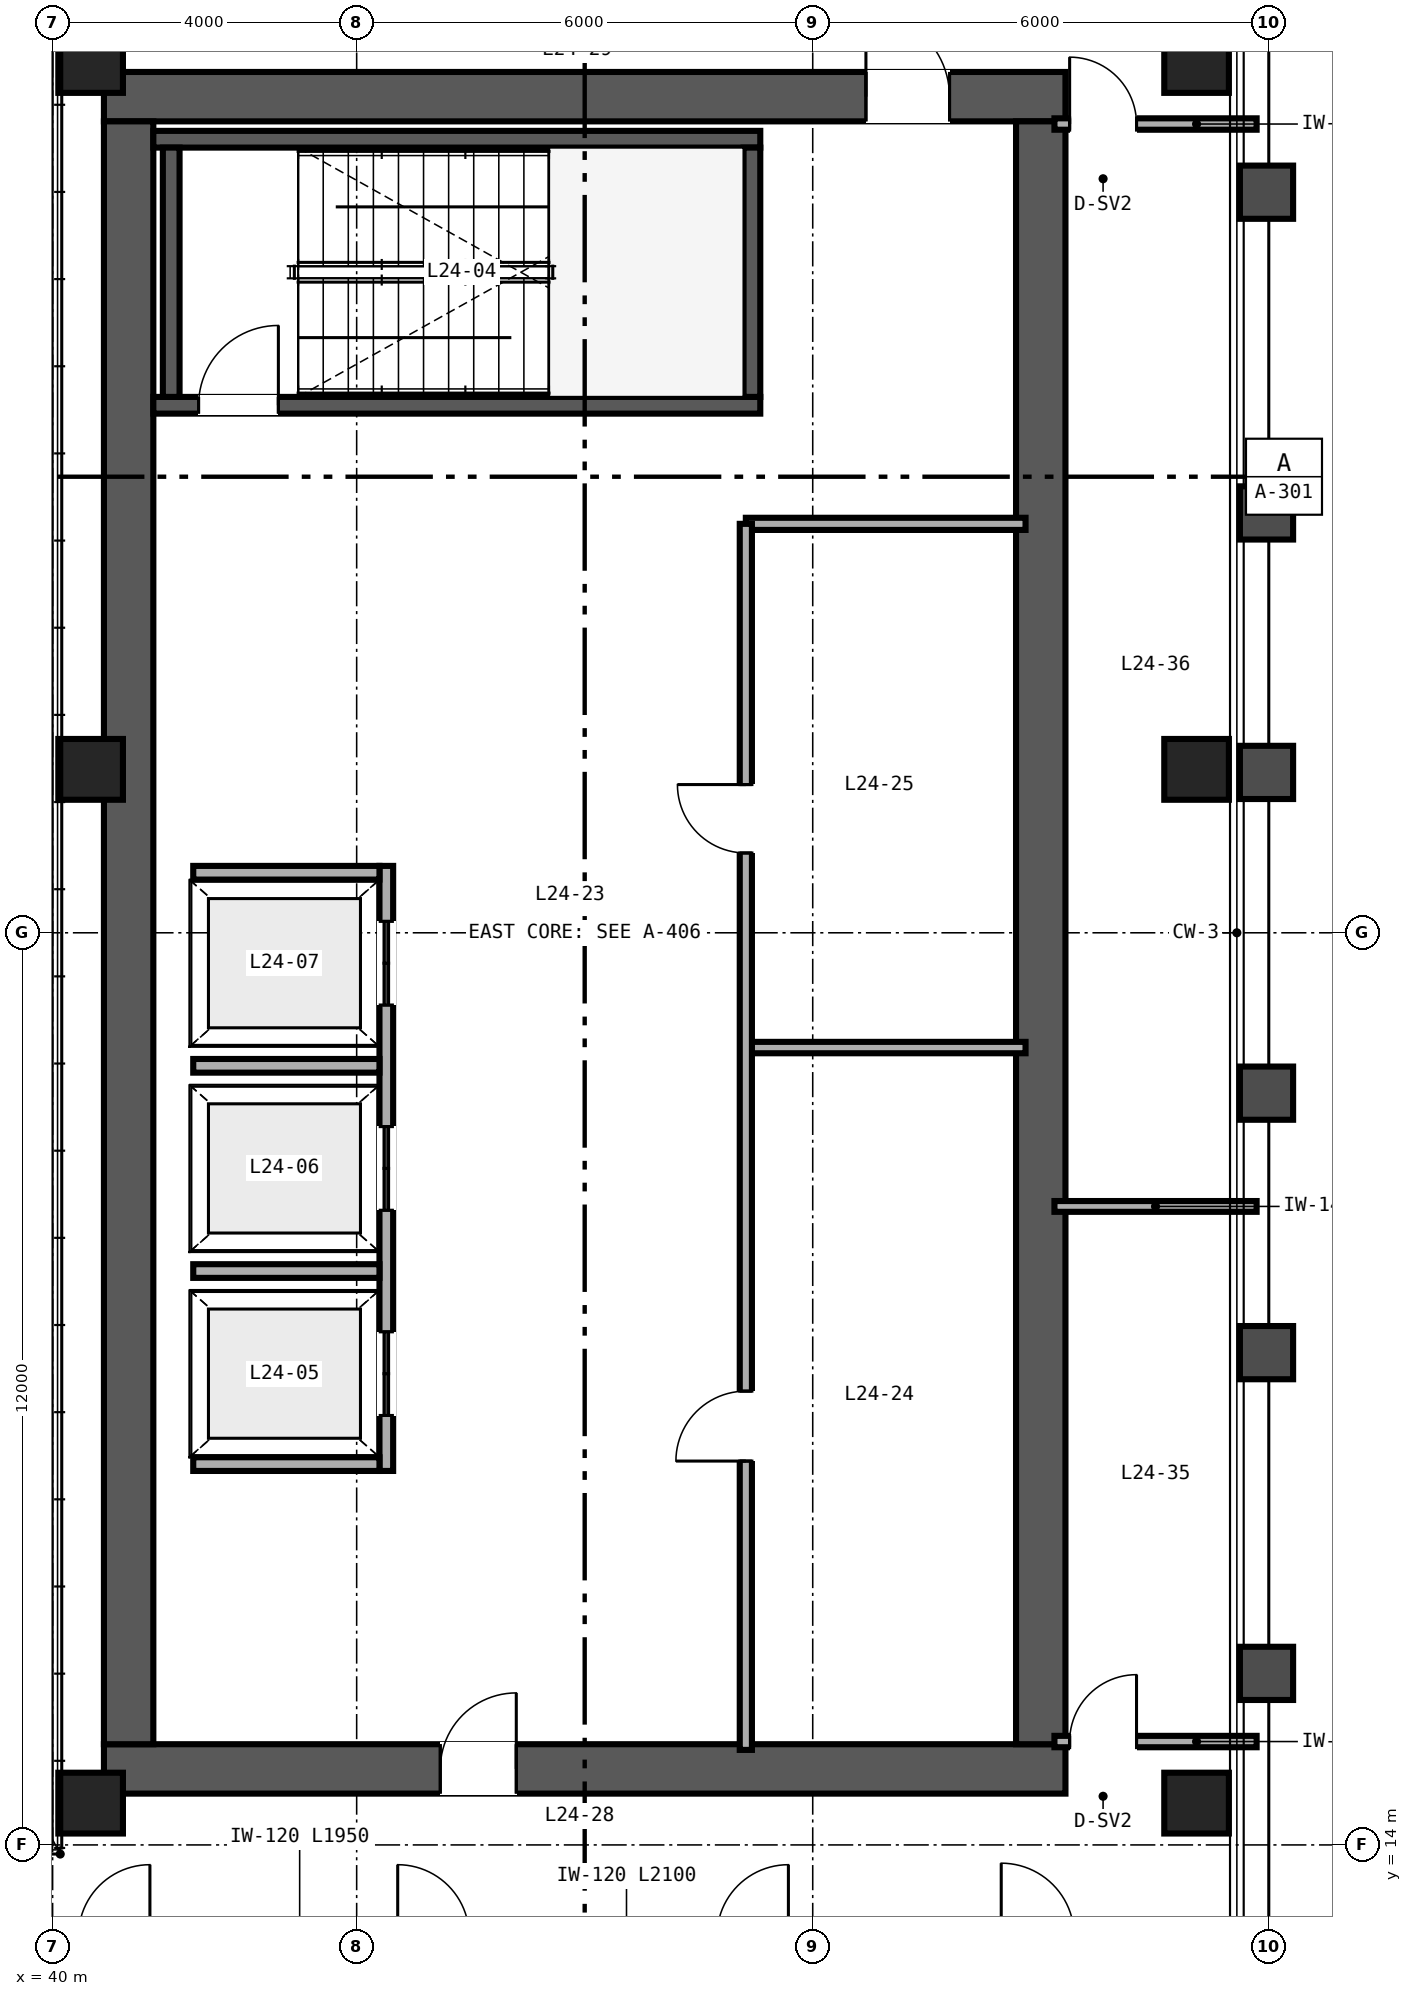
"""IFC4 building model, lengths in metres.
Left out: names, types, materials, properties, quantities, classifications, styles, units other than length and angle.
Written with IfcOpenShell. Run it as: python <this file> out.ifc"""

import sys

from ifc_helpers import new_model, si_unit, direction, frame, frame_2d, origin, origin_2d, place, context, subcontext, project, spatial, rectangle, hollow_rectangle, extrude, source, transform, mapped, element, fill, save


model = new_model("IFC4")
c1 = context("Model", 3, precision=1e-05, world=origin(), true_north=direction((0.0, 1.0)))
c2 = subcontext(c1, "Body", "Model", "MODEL_VIEW")
j1 = project(units=[si_unit("LENGTHUNIT", "METRE"), si_unit("PLANEANGLEUNIT", "RADIAN")], contexts=[c1])
p1 = place(None, origin())
s1 = spatial("IfcSite", under=j1, at=p1, CompositionType="ELEMENT")
p2 = place(p1, origin())
s2 = spatial("IfcBuilding", under=s1, at=p2, CompositionType="ELEMENT")
p3 = place(p2, frame((0.0, 0.0, 100.8)))
s3 = spatial("IfcBuildingStorey", under=s2, at=p3, CompositionType="ELEMENT", Elevation=100.8)
p4 = place(p3, frame((40.675, 15.0, 0.0), z_axis=(0.0, 0.0, 1.0), x_axis=(1.0, 0.0, 0.0)))
e1 = element("IfcWall", 1, at=p4, inside=s3, PredefinedType="SHEAR", context=c2, shape_type="SweptSolid", body=[
    extrude(rectangle(XDim=12.65, YDim=0.65, at=frame_2d((6.325, 0.0))), origin(), (0.0, 0.0, 1.0), 3.36),
])
p5 = place(p4, frame((4.425, 0.0, 0.0)))
e2 = element("IfcOpeningElement", 2, at=p5, cuts=e1, PredefinedType="OPENING", context=c2, shape_type="SweptSolid", body=[
    extrude(rectangle(XDim=1.0, YDim=2.15, at=frame_2d((0.5, 1.075))), frame((0.0, 0.335, 0.0), z_axis=(0.0, -1.0, 0.0), x_axis=(1.0, 0.0, 0.0)), (0.0, 0.0, 1.0), 0.67),
])
p6 = place(p3, frame((40.675, 37.0, 0.0), z_axis=(0.0, 0.0, 1.0), x_axis=(1.0, 0.0, 0.0)))
e3 = element("IfcWall", 3, at=p6, inside=s3, PredefinedType="SHEAR", context=c2, shape_type="SweptSolid", body=[
    extrude(rectangle(XDim=12.65, YDim=0.65, at=frame_2d((6.325, 0.0))), origin(), (0.0, 0.0, 1.0), 3.36),
])
p7 = place(p6, frame((10.025, 0.0, 0.0)))
e4 = element("IfcOpeningElement", 4, at=p7, cuts=e3, PredefinedType="OPENING", context=c2, shape_type="SweptSolid", body=[
    extrude(rectangle(XDim=1.1, YDim=2.15, at=frame_2d((0.55, 1.075))), frame((0.0, 0.335, 0.0), z_axis=(0.0, -1.0, 0.0), x_axis=(1.0, 0.0, 0.0)), (0.0, 0.0, 1.0), 0.67),
])
for number, where, z_axis, x_axis in (
    (5, (41.0, 15.325, 0.0), (0.0, 0.0, 1.0), (0.0, 1.0, 0.0)),
    (6, (53.0, 15.325, 0.0), (0.0, 0.0, 1.0), (0.0, 1.0, 0.0)),
):
    element("IfcWall", number, at=place(p3, frame(where, z_axis=z_axis, x_axis=x_axis)), inside=s3, PredefinedType="SHEAR", context=c2, shape_type="SweptSolid", body=[
        extrude(rectangle(XDim=21.35, YDim=0.65, at=frame_2d((10.675, 0.0))), origin(), (0.0, 0.0, 1.0), 3.36),
    ])
p8 = place(p3, frame((41.325, 32.94, 0.0), z_axis=(0.0, 0.0, 1.0), x_axis=(1.0, 0.0, 0.0)))
e7 = element("IfcWall", 7, at=p8, inside=s3, PredefinedType="SHEAR", context=c2, shape_type="SweptSolid", body=[
    extrude(rectangle(XDim=7.985, YDim=0.22, at=frame_2d((3.993, 0.0))), origin(), (0.0, 0.0, 1.0), 3.4),
])
p9 = place(p8, frame((0.595, 0.0, 0.0)))
e8 = element("IfcOpeningElement", 8, at=p9, cuts=e7, PredefinedType="OPENING", context=c2, shape_type="SweptSolid", body=[
    extrude(rectangle(XDim=1.05, YDim=2.15, at=frame_2d((0.525, 1.075))), frame((0.0, 0.12, 0.0), z_axis=(0.0, -1.0, 0.0), x_axis=(1.0, 0.0, 0.0)), (0.0, 0.0, 1.0), 0.24),
])
p10 = place(p3, frame((41.325, 36.44, 0.0), z_axis=(0.0, 0.0, 1.0), x_axis=(1.0, 0.0, 0.0)))
e9 = element("IfcWall", 9, at=p10, inside=s3, PredefinedType="SHEAR", context=c2, shape_type="SweptSolid", body=[
    extrude(rectangle(XDim=7.985, YDim=0.22, at=frame_2d((3.993, 0.0))), origin(), (0.0, 0.0, 1.0), 3.4),
])
for number, where, z_axis, x_axis in (
    (10, (41.56, 33.05, 0.0), (0.0, 0.0, 1.0), (0.0, 1.0, 0.0)),
    (11, (49.2, 33.05, 0.0), (0.0, 0.0, 1.0), (0.0, 1.0, 0.0)),
):
    element("IfcWall", number, at=place(p3, frame(where, z_axis=z_axis, x_axis=x_axis)), inside=s3, PredefinedType="SHEAR", context=c2, shape_type="SweptSolid", body=[
        extrude(rectangle(XDim=3.28, YDim=0.22, at=frame_2d((1.64, 0.0))), origin(), (0.0, 0.0, 1.0), 3.4),
    ])
m1 = source(origin(), c2, "Body", "SweptSolid", [
    extrude(hollow_rectangle(XDim=0.85, YDim=0.8, WallThickness=0.032, at=origin_2d()), origin(), (0.0, 0.0, 1.0), 3.36),
])
for number, where, z_axis, x_axis in (
    (12, (40.5, 14.55, 0.0), (0.0, 0.0, 1.0), (1.0, 0.0, 0.0)),
    (13, (55.05, 14.55, 0.0), (0.0, 0.0, 1.0), (1.0, 0.0, 0.0)),
    (14, (40.5, 28.15, 0.0), (0.0, 0.0, 1.0), (1.0, 0.0, 0.0)),
    (15, (55.05, 28.15, 0.0), (0.0, 0.0, 1.0), (1.0, 0.0, 0.0)),
    (16, (40.5, 37.45, 0.0), (0.0, 0.0, 1.0), (1.0, 0.0, 0.0)),
    (17, (55.05, 37.45, 0.0), (0.0, 0.0, 1.0), (1.0, 0.0, 0.0)),
):
    element("IfcColumn", number, at=place(p3, frame(where, z_axis=z_axis, x_axis=x_axis)), inside=s3, PredefinedType="COLUMN", context=c2, shape_type="MappedRepresentation", body=[
        mapped(m1, transform((0.0, 0.0, 0.0), scale=1.0)),
    ])
p11 = place(p3, frame((44.39, 18.92, 0.0), z_axis=(0.0, 0.0, 1.0), x_axis=(0.0, 1.0, 0.0)))
e18 = element("IfcWall", 18, at=p11, inside=s3, PredefinedType="SOLIDWALL", context=c2, shape_type="SweptSolid", body=[
    extrude(rectangle(XDim=7.96, YDim=0.18, at=frame_2d((3.98, 0.0))), origin(), (0.0, 0.0, 1.0), 3.36),
])
p12 = place(p11, frame((0.73, 0.0, 0.0)))
e19 = element("IfcOpeningElement", 19, at=p12, cuts=e18, PredefinedType="OPENING", context=c2, shape_type="SweptSolid", body=[
    extrude(rectangle(XDim=1.1, YDim=2.2, at=frame_2d((0.55, 1.1))), frame((0.0, 0.1, 0.0), z_axis=(0.0, -1.0, 0.0), x_axis=(1.0, 0.0, 0.0)), (0.0, 0.0, 1.0), 0.2),
])
p13 = place(p11, frame((3.43, 0.0, 0.0)))
e20 = element("IfcOpeningElement", 20, at=p13, cuts=e18, PredefinedType="OPENING", context=c2, shape_type="SweptSolid", body=[
    extrude(rectangle(XDim=1.1, YDim=2.2, at=frame_2d((0.55, 1.1))), frame((0.0, 0.1, 0.0), z_axis=(0.0, -1.0, 0.0), x_axis=(1.0, 0.0, 0.0)), (0.0, 0.0, 1.0), 0.2),
])
p14 = place(p11, frame((6.13, 0.0, 0.0)))
e21 = element("IfcOpeningElement", 21, at=p14, cuts=e18, PredefinedType="OPENING", context=c2, shape_type="SweptSolid", body=[
    extrude(rectangle(XDim=1.1, YDim=2.2, at=frame_2d((0.55, 1.1))), frame((0.0, 0.1, 0.0), z_axis=(0.0, -1.0, 0.0), x_axis=(1.0, 0.0, 0.0)), (0.0, 0.0, 1.0), 0.2),
])
for number, where, z_axis, x_axis in (
    (22, (41.85, 19.01, 0.0), (0.0, 0.0, 1.0), (1.0, 0.0, 0.0)),
    (23, (41.85, 26.79, 0.0), (0.0, 0.0, 1.0), (1.0, 0.0, 0.0)),
    (24, (41.85, 21.55, 0.0), (0.0, 0.0, 1.0), (1.0, 0.0, 0.0)),
    (25, (41.85, 24.25, 0.0), (0.0, 0.0, 1.0), (1.0, 0.0, 0.0)),
):
    element("IfcWall", number, at=place(p3, frame(where, z_axis=z_axis, x_axis=x_axis)), inside=s3, PredefinedType="SOLIDWALL", context=c2, shape_type="SweptSolid", body=[
        extrude(rectangle(XDim=2.45, YDim=0.18, at=frame_2d((1.225, 0.0))), origin(), (0.0, 0.0, 1.0), 3.36),
    ])
p15 = place(p3, frame((49.12, 31.38, 0.0), z_axis=(0.0, 0.0, 1.0), x_axis=(1.0, 0.0, 0.0)))
e26 = element("IfcWall", 26, at=p15, inside=s3, PredefinedType="PARTITIONING", context=c2, shape_type="SweptSolid", body=[
    extrude(rectangle(XDim=3.68, YDim=0.16, at=frame_2d((1.84, 0.0))), origin(), (0.0, 0.0, 1.0), 2.36),
])
p16 = place(p3, frame((49.12, 24.49, 0.0), z_axis=(0.0, 0.0, 1.0), x_axis=(1.0, 0.0, 0.0)))
e27 = element("IfcWall", 27, at=p16, inside=s3, PredefinedType="PARTITIONING", context=c2, shape_type="SweptSolid", body=[
    extrude(rectangle(XDim=3.68, YDim=0.15, at=frame_2d((1.84, 0.0))), origin(), (0.0, 0.0, 1.0), 3.36),
])
p17 = place(p3, frame((49.12, 15.25, 0.0), z_axis=(0.0, 0.0, 1.0), x_axis=(0.0, 1.0, 0.0)))
e28 = element("IfcWall", 28, at=p17, inside=s3, PredefinedType="PARTITIONING", context=c2, shape_type="SweptSolid", body=[
    extrude(rectangle(XDim=16.13, YDim=0.16, at=frame_2d((8.065, 0.0))), origin(), (0.0, 0.0, 1.0), 2.36),
])
p18 = place(p17, frame((3.8, 0.0, 0.0)))
e29 = element("IfcOpeningElement", 29, at=p18, cuts=e28, PredefinedType="OPENING", context=c2, shape_type="SweptSolid", body=[
    extrude(rectangle(XDim=0.92, YDim=2.15, at=frame_2d((0.46, 1.075))), frame((0.0, 0.09, 0.0), z_axis=(0.0, -1.0, 0.0), x_axis=(1.0, 0.0, 0.0)), (0.0, 0.0, 1.0), 0.18),
])
p19 = place(p17, frame((11.8, 0.0, 0.0)))
e30 = element("IfcOpeningElement", 30, at=p19, cuts=e28, PredefinedType="OPENING", context=c2, shape_type="SweptSolid", body=[
    extrude(rectangle(XDim=0.9, YDim=2.15, at=frame_2d((0.45, 1.075))), frame((0.0, 0.09, 0.0), z_axis=(0.0, -1.0, 0.0), x_axis=(1.0, 0.0, 0.0)), (0.0, 0.0, 1.0), 0.18),
])
p20 = place(p3, frame((53.18, 15.36, 0.0), z_axis=(0.0, 0.0, 1.0), x_axis=(1.0, 0.0, 0.0)))
e31 = element("IfcWall", 31, at=p20, inside=s3, PredefinedType="PARTITIONING", context=c2, shape_type="SweptSolid", body=[
    extrude(rectangle(XDim=2.66, YDim=0.15, at=frame_2d((1.33, 0.0))), origin(), (0.0, 0.0, 1.0), 2.581),
])
p21 = place(p20, frame((0.2, 0.0, 0.0)))
e32 = element("IfcOpeningElement", 32, at=p21, cuts=e31, PredefinedType="OPENING", context=c2, shape_type="SweptSolid", body=[
    extrude(rectangle(XDim=0.88, YDim=2.15, at=frame_2d((0.44, 1.075))), frame((0.0, 0.085, 0.0), z_axis=(0.0, -1.0, 0.0), x_axis=(1.0, 0.0, 0.0)), (0.0, 0.0, 1.0), 0.17),
])
p22 = place(p3, frame((53.18, 36.64, 0.0), z_axis=(0.0, 0.0, 1.0), x_axis=(1.0, 0.0, 0.0)))
e33 = element("IfcWall", 33, at=p22, inside=s3, PredefinedType="PARTITIONING", context=c2, shape_type="SweptSolid", body=[
    extrude(rectangle(XDim=2.66, YDim=0.15, at=frame_2d((1.33, 0.0))), origin(), (0.0, 0.0, 1.0), 2.743),
])
p23 = place(p22, frame((0.2, 0.0, 0.0)))
e34 = element("IfcOpeningElement", 34, at=p23, cuts=e33, PredefinedType="OPENING", context=c2, shape_type="SweptSolid", body=[
    extrude(rectangle(XDim=0.88, YDim=2.15, at=frame_2d((0.44, 1.075))), frame((0.0, 0.085, 0.0), z_axis=(0.0, -1.0, 0.0), x_axis=(1.0, 0.0, 0.0)), (0.0, 0.0, 1.0), 0.17),
])
p24 = place(p3, frame((53.18, 22.4, 0.0), z_axis=(0.0, 0.0, 1.0), x_axis=(1.0, 0.0, 0.0)))
e35 = element("IfcWall", 35, at=p24, inside=s3, PredefinedType="PARTITIONING", context=c2, shape_type="SweptSolid", body=[
    extrude(rectangle(XDim=2.66, YDim=0.142, at=frame_2d((1.33, 0.0))), origin(), (0.0, 0.0, 1.0), 2.581),
])
m2 = source(origin(), c2, "Body", "SweptSolid", [
    extrude(rectangle(XDim=1.05, YDim=2.15, at=frame_2d((0.525, 1.075))), frame((0.0, 0.025, 0.0), z_axis=(0.0, -1.0, 0.0), x_axis=(1.0, 0.0, 0.0)), (0.0, 0.0, 1.0), 0.05),
])
p25 = place(p9, origin())
e36 = element("IfcDoor", 36, at=p25, inside=s3, OperationType="SINGLE_SWING_RIGHT", PredefinedType="DOOR", context=c2, shape_type="MappedRepresentation", body=[
    mapped(m2, transform((0.0, 0.0, 0.0), scale=1.0)),
])
fill(e8, e36)
m3 = source(origin(), c2, "Body", "SweptSolid", [
    extrude(rectangle(XDim=1.1, YDim=2.2, at=frame_2d((0.55, 1.1))), frame((0.0, 0.025, 0.0), z_axis=(0.0, -1.0, 0.0), x_axis=(1.0, 0.0, 0.0)), (0.0, 0.0, 1.0), 0.05),
])
p26 = place(p12, origin())
e37 = element("IfcDoor", 37, at=p26, inside=s3, OperationType="DOUBLE_DOOR_SLIDING", PredefinedType="DOOR", context=c2, shape_type="MappedRepresentation", body=[
    mapped(m3, transform((0.0, 0.0, 0.0), scale=1.0)),
])
fill(e19, e37)
p27 = place(p13, origin())
e38 = element("IfcDoor", 38, at=p27, inside=s3, OperationType="DOUBLE_DOOR_SLIDING", PredefinedType="DOOR", context=c2, shape_type="MappedRepresentation", body=[
    mapped(m3, transform((0.0, 0.0, 0.0), scale=1.0)),
])
fill(e20, e38)
p28 = place(p14, origin())
e39 = element("IfcDoor", 39, at=p28, inside=s3, OperationType="DOUBLE_DOOR_SLIDING", PredefinedType="DOOR", context=c2, shape_type="MappedRepresentation", body=[
    mapped(m3, transform((0.0, 0.0, 0.0), scale=1.0)),
])
fill(e21, e39)
m4 = source(origin(), c2, "Body", "SweptSolid", [
    extrude(rectangle(XDim=1.0, YDim=2.15, at=frame_2d((0.5, 1.075))), frame((0.0, 0.025, 0.0), z_axis=(0.0, -1.0, 0.0), x_axis=(1.0, 0.0, 0.0)), (0.0, 0.0, 1.0), 0.05),
])
p29 = place(p5, origin())
e40 = element("IfcDoor", 40, at=p29, inside=s3, OperationType="SINGLE_SWING_RIGHT", PredefinedType="DOOR", context=c2, shape_type="MappedRepresentation", body=[
    mapped(m4, transform((0.0, 0.0, 0.0), scale=1.0)),
])
fill(e2, e40)
m5 = source(origin(), c2, "Body", "SweptSolid", [
    extrude(rectangle(XDim=1.1, YDim=2.15, at=frame_2d((0.55, 1.075))), frame((0.0, 0.025, 0.0), z_axis=(0.0, -1.0, 0.0), x_axis=(1.0, 0.0, 0.0)), (0.0, 0.0, 1.0), 0.05),
])
p30 = place(p7, origin())
e41 = element("IfcDoor", 41, at=p30, inside=s3, OperationType="SINGLE_SWING_LEFT", PredefinedType="DOOR", context=c2, shape_type="MappedRepresentation", body=[
    mapped(m5, transform((0.0, 0.0, 0.0), scale=1.0)),
])
fill(e4, e41)
m6 = source(origin(), c2, "Body", "SweptSolid", [
    extrude(rectangle(XDim=0.92, YDim=2.15, at=frame_2d((0.46, 1.075))), frame((0.0, 0.025, 0.0), z_axis=(0.0, -1.0, 0.0), x_axis=(1.0, 0.0, 0.0)), (0.0, 0.0, 1.0), 0.05),
])
p31 = place(p18, origin())
e42 = element("IfcDoor", 42, at=p31, inside=s3, OperationType="SINGLE_SWING_LEFT", PredefinedType="DOOR", context=c2, shape_type="MappedRepresentation", body=[
    mapped(m6, transform((0.0, 0.0, 0.0), scale=1.0)),
])
fill(e29, e42)
m7 = source(origin(), c2, "Body", "SweptSolid", [
    extrude(rectangle(XDim=0.9, YDim=2.15, at=frame_2d((0.45, 1.075))), frame((0.0, 0.025, 0.0), z_axis=(0.0, -1.0, 0.0), x_axis=(1.0, 0.0, 0.0)), (0.0, 0.0, 1.0), 0.05),
])
p32 = place(p19, origin())
e43 = element("IfcDoor", 43, at=p32, inside=s3, OperationType="SINGLE_SWING_RIGHT", PredefinedType="DOOR", context=c2, shape_type="MappedRepresentation", body=[
    mapped(m7, transform((0.0, 0.0, 0.0), scale=1.0)),
])
fill(e30, e43)
m8 = source(origin(), c2, "Body", "SweptSolid", [
    extrude(rectangle(XDim=0.88, YDim=2.15, at=frame_2d((0.44, 1.075))), frame((0.0, 0.025, 0.0), z_axis=(0.0, -1.0, 0.0), x_axis=(1.0, 0.0, 0.0)), (0.0, 0.0, 1.0), 0.05),
])
p33 = place(p21, origin())
e44 = element("IfcDoor", 44, at=p33, inside=s3, OperationType="SINGLE_SWING_RIGHT", PredefinedType="DOOR", context=c2, shape_type="MappedRepresentation", body=[
    mapped(m8, transform((0.0, 0.0, 0.0), scale=1.0)),
])
fill(e32, e44)
p34 = place(p23, origin())
e45 = element("IfcDoor", 45, at=p34, inside=s3, OperationType="SINGLE_SWING_LEFT", PredefinedType="DOOR", context=c2, shape_type="MappedRepresentation", body=[
    mapped(m8, transform((0.0, 0.0, 0.0), scale=1.0)),
])
fill(e34, e45)
save(model, sys.argv[1])
